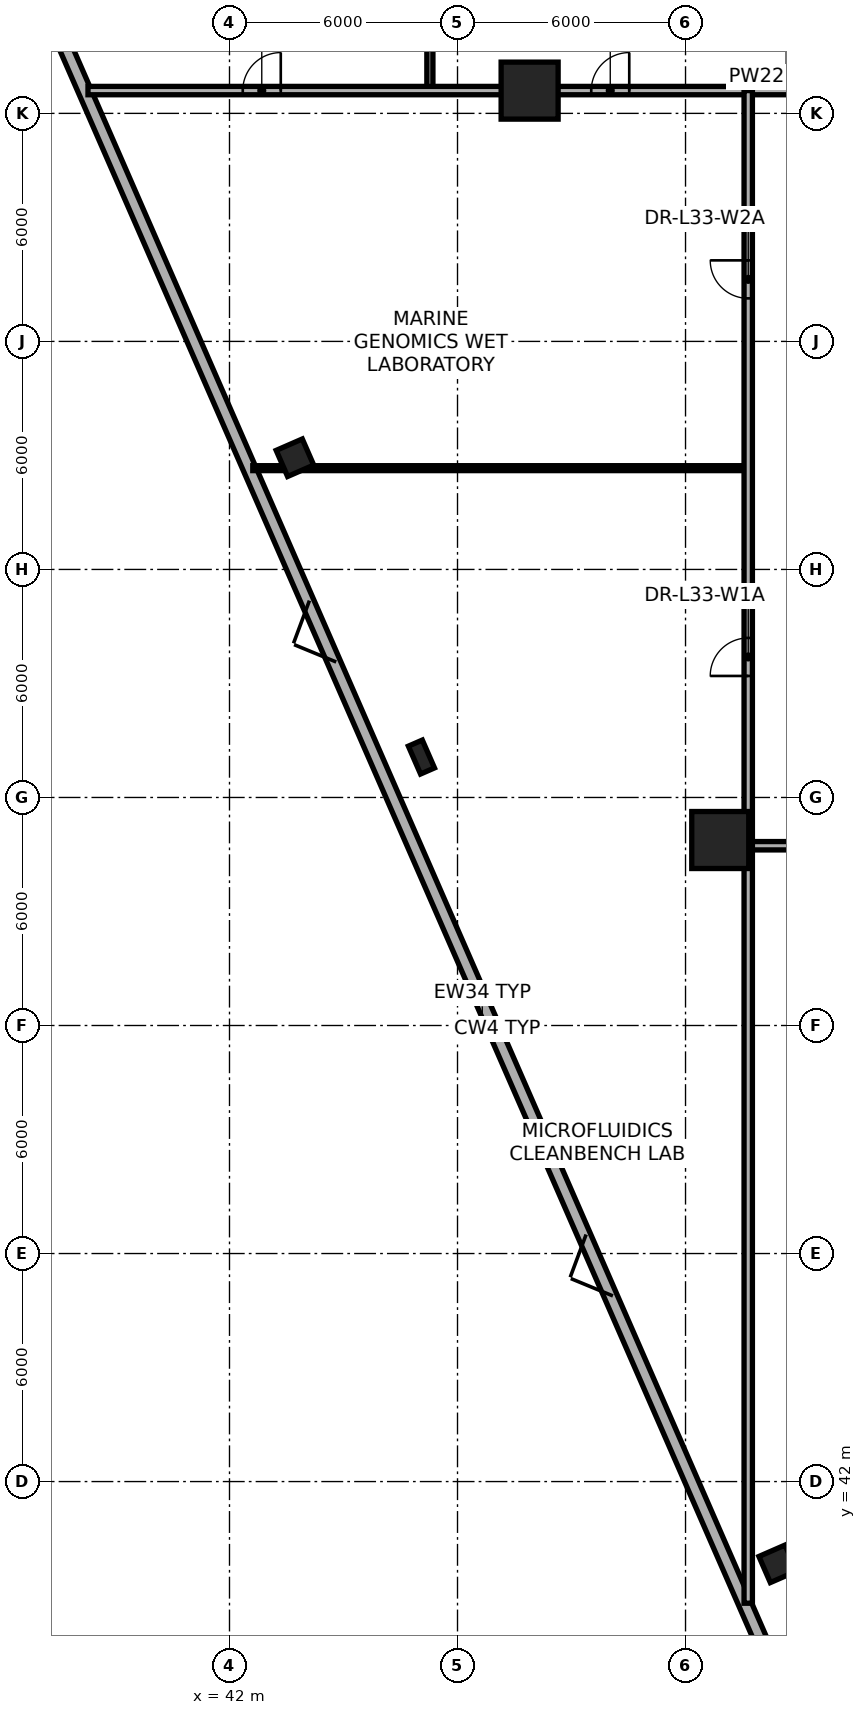
"""IFC4 building model, lengths in metres.
Left out: names, types, materials, properties, quantities, classifications, styles, units other than length and angle.
Written with IfcOpenShell. Run it as: python <this file> out.ifc"""

import sys

from ifc_helpers import new_model, si_unit, direction, frame, frame_2d, origin, origin_2d, place, context, subcontext, project, spatial, rectangle, extrude, element, fill, save


model = new_model("IFC4")
c1 = context("Model", 3, precision=1e-05, world=origin(), true_north=direction((0.0, 1.0)))
c2 = subcontext(c1, "Body", "Model", "MODEL_VIEW")
j1 = project(units=[si_unit("LENGTHUNIT", "METRE"), si_unit("PLANEANGLEUNIT", "RADIAN")], contexts=[c1])
p1 = place(None, origin())
s1 = spatial("IfcSite", under=j1, at=p1, CompositionType="ELEMENT")
p2 = place(p1, origin())
s2 = spatial("IfcBuilding", under=s1, at=p2, CompositionType="ELEMENT")
p3 = place(p2, frame((0.0, 0.0, 127.2)))
s3 = spatial("IfcBuildingStorey", under=s2, at=p3, CompositionType="ELEMENT", Elevation=127.2)
for number, where, z_axis, x_axis in (
    (1, (49.898, 78.599, 0.0), (0.0, 0.0, 1.0), (1.0, 0.0, 0.0)),
    (2, (54.914, 58.88, 0.0), (0.0, 0.0, 1.0), (1.0, 0.0, 0.0)),
):
    element("IfcColumn", number, at=place(p3, frame(where, z_axis=z_axis, x_axis=x_axis)), inside=s3, PredefinedType="COLUMN", context=c2, shape_type="SweptSolid", body=[
        extrude(rectangle(XDim=1.5, YDim=1.5, at=origin_2d()), origin(), (0.0, 0.0, 1.0), 3.65),
    ])
p4 = place(p3, frame((43.651, 68.95, 0.003), z_axis=(0.039229493406, -0.00569028488, 0.999214024874), x_axis=(0.963712059799, 0.264460249095, -0.036329635929)))
e3 = element("IfcColumn", 3, at=p4, inside=s3, PredefinedType="COLUMN", context=c2, shape_type="SweptSolid", body=[
    extrude(rectangle(XDim=0.75, YDim=0.75, at=origin_2d()), origin(), (0.0, 0.0, 1.0), 3.647),
])
p5 = place(p3, frame((46.992, 61.044, 0.003), z_axis=(0.032006454348, 0.010579539303, 0.999431668614), x_axis=(0.74413173798, 0.667318130053, -0.030894495196)))
e4 = element("IfcColumn", 4, at=p5, inside=s3, PredefinedType="PILASTER", context=c2, shape_type="SweptSolid", body=[
    extrude(rectangle(XDim=0.8, YDim=0.4, at=origin_2d()), origin(), (0.0, 0.0, 1.0), 3.646),
])
p6 = place(p3, frame((56.403, 39.736, 0.003), z_axis=(0.012375096162, 0.054517315524, 0.998436136818), x_axis=(-0.18757733561, 0.980912666973, -0.051235563212)))
e5 = element("IfcColumn", 5, at=p6, inside=s3, PredefinedType="COLUMN", context=c2, shape_type="SweptSolid", body=[
    extrude(rectangle(XDim=0.75, YDim=0.75, at=origin_2d()), origin(), (0.0, 0.0, 1.0), 3.65),
])
p7 = place(p3, frame((61.234, 25.793, 0.0), z_axis=(0.0, 0.0, 1.0), x_axis=(-0.400059849946, 0.916489016007, 0.0)))
e6 = element("IfcWall", 6, at=p7, inside=s3, PredefinedType="STANDARD", context=c2, shape_type="SweptSolid", body=[
    extrude(rectangle(XDim=61.299, YDim=0.34, at=frame_2d((30.649, 0.0))), origin(), (0.0, 0.0, 1.0), 0.85),
])
p8 = place(p3, frame((47.273, 78.6, 0.0), z_axis=(0.0, 0.0, 1.0), x_axis=(0.0, 1.0, 0.0)))
e7 = element("IfcWall", 7, at=p8, inside=s3, PredefinedType="PARTITIONING", context=c2, shape_type="SweptSolid", body=[
    extrude(rectangle(XDim=10.568, YDim=0.16, at=frame_2d((5.284, 0.0))), origin(), (0.0, 0.0, 1.0), 3.375),
])
p9 = place(p3, frame((38.276, 78.6, 0.0), z_axis=(0.0, 0.0, 1.0), x_axis=(1.0, 0.0, 0.0)))
e8 = element("IfcWall", 8, at=p9, inside=s3, PredefinedType="PARTITIONING", context=c2, shape_type="SweptSolid", body=[
    extrude(rectangle(XDim=36.274, YDim=0.22, at=frame_2d((18.137, 0.0))), origin(), (0.0, 0.0, 1.0), 2.575),
])
p10 = place(p9, frame((30.484, 0.0, 0.0)))
e9 = element("IfcOpeningElement", 9, at=p10, cuts=e8, PredefinedType="OPENING", context=c2, shape_type="SweptSolid", body=[
    extrude(rectangle(XDim=0.98, YDim=2.1, at=frame_2d((0.49, 1.05))), frame((0.0, 0.12, 0.0), z_axis=(0.0, -1.0, 0.0), x_axis=(1.0, 0.0, 0.0)), (0.0, 0.0, 1.0), 0.24),
])
p11 = place(p9, frame((33.309, 0.0, 0.0)))
e10 = element("IfcOpeningElement", 10, at=p11, cuts=e8, PredefinedType="OPENING", context=c2, shape_type="SweptSolid", body=[
    extrude(rectangle(XDim=0.98, YDim=2.1, at=frame_2d((0.49, 1.05))), frame((0.0, 0.12, 0.0), z_axis=(0.0, -1.0, 0.0), x_axis=(1.0, 0.0, 0.0)), (0.0, 0.0, 1.0), 0.24),
])
p12 = place(p9, frame((4.073, 0.0, 0.0)))
e11 = element("IfcOpeningElement", 11, at=p12, cuts=e8, PredefinedType="OPENING", context=c2, shape_type="SweptSolid", body=[
    extrude(rectangle(XDim=1.0, YDim=2.1, at=frame_2d((0.5, 1.05))), frame((0.0, 0.12, 0.0), z_axis=(0.0, -1.0, 0.0), x_axis=(1.0, 0.0, 0.0)), (0.0, 0.0, 1.0), 0.24),
])
p13 = place(p9, frame((13.243, 0.0, 0.0)))
e12 = element("IfcOpeningElement", 12, at=p13, cuts=e8, PredefinedType="OPENING", context=c2, shape_type="SweptSolid", body=[
    extrude(rectangle(XDim=1.0, YDim=2.1, at=frame_2d((0.5, 1.05))), frame((0.0, 0.12, 0.0), z_axis=(0.0, -1.0, 0.0), x_axis=(1.0, 0.0, 0.0)), (0.0, 0.0, 1.0), 0.24),
])
p14 = place(p9, frame((21.906, 0.0, 0.0)))
e13 = element("IfcOpeningElement", 13, at=p14, cuts=e8, PredefinedType="OPENING", context=c2, shape_type="SweptSolid", body=[
    extrude(rectangle(XDim=1.0, YDim=2.1, at=frame_2d((0.5, 1.05))), frame((0.0, 0.12, 0.0), z_axis=(0.0, -1.0, 0.0), x_axis=(1.0, 0.0, 0.0)), (0.0, 0.0, 1.0), 0.24),
])
p15 = place(p9, frame((27.409, 0.0, 0.0)))
e14 = element("IfcOpeningElement", 14, at=p15, cuts=e8, PredefinedType="OPENING", context=c2, shape_type="SweptSolid", body=[
    extrude(rectangle(XDim=1.0, YDim=2.1, at=frame_2d((0.5, 1.05))), frame((0.0, 0.12, 0.0), z_axis=(0.0, -1.0, 0.0), x_axis=(1.0, 0.0, 0.0)), (0.0, 0.0, 1.0), 0.24),
])
p16 = place(p3, frame((55.65, 58.73, 0.0), z_axis=(0.0, 0.0, 1.0), x_axis=(1.0, 0.0, 0.0)))
e15 = element("IfcWall", 15, at=p16, inside=s3, PredefinedType="PARTITIONING", context=c2, shape_type="SweptSolid", body=[
    extrude(rectangle(XDim=29.4, YDim=0.22, at=frame_2d((14.7, 0.0))), origin(), (0.0, 0.0, 1.0), 2.575),
])
p17 = place(p16, frame((3.665, 0.0, 0.0)))
e16 = element("IfcOpeningElement", 16, at=p17, cuts=e15, PredefinedType="OPENING", context=c2, shape_type="SweptSolid", body=[
    extrude(rectangle(XDim=1.5, YDim=2.2, at=frame_2d((0.75, 1.1))), frame((0.0, 0.12, 0.0), z_axis=(0.0, -1.0, 0.0), x_axis=(1.0, 0.0, 0.0)), (0.0, 0.0, 1.0), 0.24),
])
p18 = place(p16, frame((15.436, 0.0, 0.0)))
e17 = element("IfcOpeningElement", 17, at=p18, cuts=e15, PredefinedType="OPENING", context=c2, shape_type="SweptSolid", body=[
    extrude(rectangle(XDim=1.5, YDim=2.2, at=frame_2d((0.75, 1.1))), frame((0.0, 0.12, 0.0), z_axis=(0.0, -1.0, 0.0), x_axis=(1.0, 0.0, 0.0)), (0.0, 0.0, 1.0), 0.24),
])
p19 = place(p3, frame((42.613, 68.665, 0.0), z_axis=(0.0, 0.0, 1.0), x_axis=(1.0, 0.0, 0.0)))
e18 = element("IfcWall", 18, at=p19, inside=s3, PredefinedType="PARTITIONING", context=c2, shape_type="SweptSolid", body=[
    extrude(rectangle(XDim=13.037, YDim=0.13, at=frame_2d((6.519, 0.0))), origin(), (0.0, 0.0, 1.0), 2.575),
])
p20 = place(p3, frame((55.65, 38.799, 0.0), z_axis=(0.0, 0.0, 1.0), x_axis=(0.0, 1.0, 0.0)))
e19 = element("IfcWall", 19, at=p20, inside=s3, PredefinedType="PARTITIONING", context=c2, shape_type="SweptSolid", body=[
    extrude(rectangle(XDim=39.802, YDim=0.22, at=frame_2d((19.901, 0.0))), origin(), (0.0, 0.0, 1.0), 2.575),
])
p21 = place(p20, frame((24.399, 0.0, 0.0)))
e20 = element("IfcOpeningElement", 20, at=p21, cuts=e19, PredefinedType="OPENING", context=c2, shape_type="SweptSolid", body=[
    extrude(rectangle(XDim=1.0, YDim=2.1, at=frame_2d((0.5, 1.05))), frame((0.0, 0.12, 0.0), z_axis=(0.0, -1.0, 0.0), x_axis=(1.0, 0.0, 0.0)), (0.0, 0.0, 1.0), 0.24),
])
p22 = place(p20, frame((34.334, 0.0, 0.0)))
e21 = element("IfcOpeningElement", 21, at=p22, cuts=e19, PredefinedType="OPENING", context=c2, shape_type="SweptSolid", body=[
    extrude(rectangle(XDim=1.0, YDim=2.1, at=frame_2d((0.5, 1.05))), frame((0.0, 0.12, 0.0), z_axis=(0.0, -1.0, 0.0), x_axis=(1.0, 0.0, 0.0)), (0.0, 0.0, 1.0), 0.24),
])
p23 = place(p12, origin())
e22 = element("IfcDoor", 22, at=p23, inside=s3, OperationType="SINGLE_SWING_RIGHT", PredefinedType="DOOR", context=c2, shape_type="SweptSolid", body=[
    extrude(rectangle(XDim=1.0, YDim=2.1, at=frame_2d((0.5, 1.05))), frame((0.0, 0.025, 0.0), z_axis=(0.0, -1.0, 0.0), x_axis=(1.0, 0.0, 0.0)), (0.0, 0.0, 1.0), 0.05),
])
fill(e11, e22)
p24 = place(p13, origin())
e23 = element("IfcDoor", 23, at=p24, inside=s3, OperationType="SINGLE_SWING_RIGHT", PredefinedType="DOOR", context=c2, shape_type="SweptSolid", body=[
    extrude(rectangle(XDim=1.0, YDim=2.1, at=frame_2d((0.5, 1.05))), frame((0.0, 0.025, 0.0), z_axis=(0.0, -1.0, 0.0), x_axis=(1.0, 0.0, 0.0)), (0.0, 0.0, 1.0), 0.05),
])
fill(e12, e23)
p25 = place(p21, origin())
e24 = element("IfcDoor", 24, at=p25, inside=s3, OperationType="SINGLE_SWING_LEFT", PredefinedType="DOOR", context=c2, shape_type="SweptSolid", body=[
    extrude(rectangle(XDim=1.0, YDim=2.1, at=frame_2d((0.5, 1.05))), frame((0.0, 0.025, 0.0), z_axis=(0.0, -1.0, 0.0), x_axis=(1.0, 0.0, 0.0)), (0.0, 0.0, 1.0), 0.05),
])
fill(e20, e24)
p26 = place(p22, origin())
e25 = element("IfcDoor", 25, at=p26, inside=s3, OperationType="SINGLE_SWING_RIGHT", PredefinedType="DOOR", context=c2, shape_type="SweptSolid", body=[
    extrude(rectangle(XDim=1.0, YDim=2.1, at=frame_2d((0.5, 1.05))), frame((0.0, 0.025, 0.0), z_axis=(0.0, -1.0, 0.0), x_axis=(1.0, 0.0, 0.0)), (0.0, 0.0, 1.0), 0.05),
])
fill(e21, e25)
save(model, sys.argv[1])
